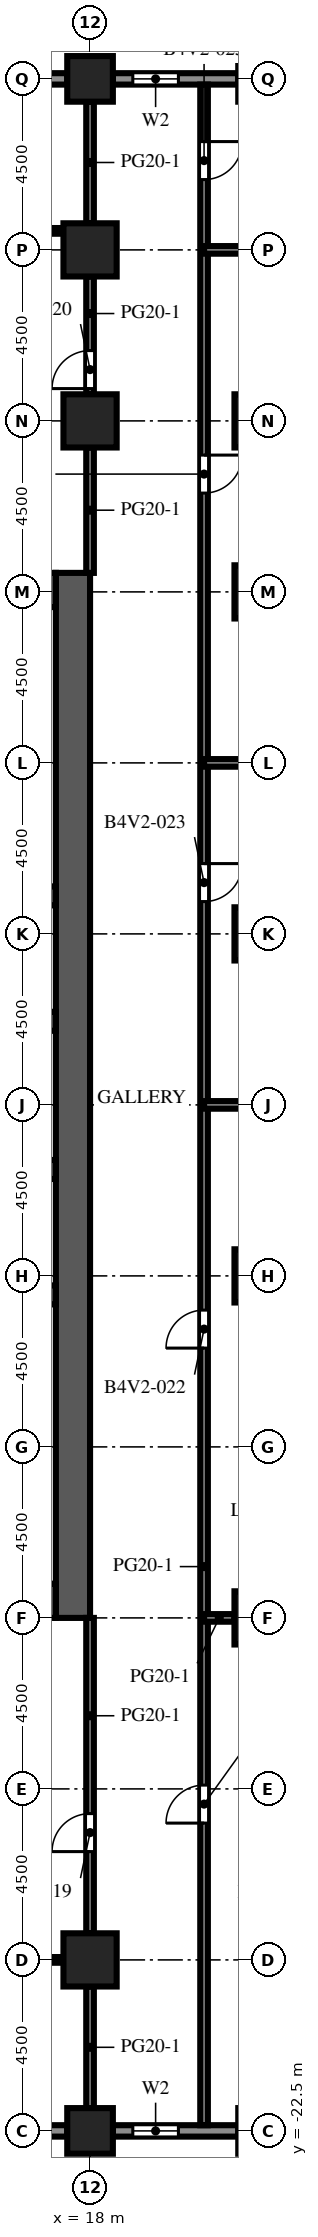
"""IFC4 building model, lengths in metres.
Left out: names, types, materials, properties, quantities, classifications, styles, units other than length and angle.
Written with IfcOpenShell. Run it as: python <this file> out.ifc"""

import sys

from ifc_helpers import new_model, si_unit, direction, frame, frame_2d, origin, origin_2d, place, context, subcontext, project, spatial, rectangle, extrude, element, fill, save


model = new_model("IFC4")
c1 = context("Model", 3, precision=1e-05, world=origin(), true_north=direction((0.0, 1.0)))
c2 = subcontext(c1, "Body", "Model", "MODEL_VIEW")
j1 = project(units=[si_unit("LENGTHUNIT", "METRE"), si_unit("PLANEANGLEUNIT", "RADIAN")], contexts=[c1])
p1 = place(None, origin())
s1 = spatial("IfcSite", under=j1, at=p1, CompositionType="ELEMENT")
p2 = place(p1, origin())
s2 = spatial("IfcBuilding", under=s1, at=p2, CompositionType="ELEMENT")
p3 = place(p2, frame((0.0, 0.0, 137.2)))
s3 = spatial("IfcBuildingStorey", under=s2, at=p3, CompositionType="ELEMENT", Elevation=137.2)
for number, where, z_axis, x_axis in (
    (1, (18.0, -22.5, 0.0), (0.0, 0.0, 1.0), (1.0, 0.0, 0.0)),
    (2, (18.0, 31.5, 0.0), (0.0, 0.0, 1.0), (1.0, 0.0, 0.0)),
):
    element("IfcColumn", number, at=place(p3, frame(where, z_axis=z_axis, x_axis=x_axis)), inside=s3, PredefinedType="COLUMN", context=c2, shape_type="SweptSolid", body=[
        extrude(rectangle(XDim=1.2, YDim=1.2, at=origin_2d()), origin(), (0.0, 0.0, 1.0), 4.1),
    ])
for number, where, z_axis, x_axis in (
    (3, (18.0, -18.0, 0.0), (0.0, 0.0, 1.0), (1.0, 0.0, 0.0)),
    (4, (18.0, 22.5, 0.0), (0.0, 0.0, 1.0), (1.0, 0.0, 0.0)),
    (5, (18.0, 27.0, 0.0), (0.0, 0.0, 1.0), (1.0, 0.0, 0.0)),
    (6, (22.5, -9.0, 0.0), (0.0, 0.0, 1.0), (1.0, 0.0, 0.0)),
    (7, (22.5, 0.0, 0.0), (0.0, 0.0, 1.0), (1.0, 0.0, 0.0)),
    (8, (22.5, 9.0, 0.0), (0.0, 0.0, 1.0), (1.0, 0.0, 0.0)),
    (9, (22.5, 18.0, 0.0), (0.0, 0.0, 1.0), (1.0, 0.0, 0.0)),
    (10, (22.5, 22.5, 0.0), (0.0, 0.0, 1.0), (1.0, 0.0, 0.0)),
):
    element("IfcColumn", number, at=place(p3, frame(where, z_axis=z_axis, x_axis=x_axis)), inside=s3, PredefinedType="COLUMN", context=c2, shape_type="SweptSolid", body=[
        extrude(rectangle(XDim=1.4, YDim=1.4, at=origin_2d()), origin(), (0.0, 0.0, 1.0), 4.1),
    ])
p4 = place(p3, frame((17.55, -9.0, 0.0), z_axis=(0.0, 0.0, 1.0), x_axis=(0.0, 1.0, 0.0)))
e11 = element("IfcWall", 11, at=p4, inside=s3, PredefinedType="SHEAR", context=c2, shape_type="SweptSolid", body=[
    extrude(rectangle(XDim=27.5, YDim=0.9, at=frame_2d((13.75, 0.0))), origin(), (0.0, 0.0, 1.0), 4.1),
])
p5 = place(p4, frame((12.55, 0.0, 0.0)))
e12 = element("IfcOpeningElement", 12, at=p5, cuts=e11, PredefinedType="OPENING", context=c2, shape_type="SweptSolid", body=[
    extrude(rectangle(XDim=2.4, YDim=2.4, at=frame_2d((1.2, 1.2))), frame((0.0, 0.46, 0.0), z_axis=(0.0, -1.0, 0.0), x_axis=(1.0, 0.0, 0.0)), (0.0, 0.0, 1.0), 0.92),
])
p6 = place(p4, frame((6.825, 0.0, 0.0)))
e13 = element("IfcOpeningElement", 13, at=p6, cuts=e11, PredefinedType="OPENING", context=c2, shape_type="SweptSolid", body=[
    extrude(rectangle(XDim=1.2, YDim=2.1, at=frame_2d((0.6, 1.05))), frame((0.0, 0.46, 0.0), z_axis=(0.0, -1.0, 0.0), x_axis=(1.0, 0.0, 0.0)), (0.0, 0.0, 1.0), 0.92),
])
p7 = place(p4, frame((19.475, 0.0, 0.0)))
e14 = element("IfcOpeningElement", 14, at=p7, cuts=e11, PredefinedType="OPENING", context=c2, shape_type="SweptSolid", body=[
    extrude(rectangle(XDim=1.2, YDim=2.1, at=frame_2d((0.6, 1.05))), frame((0.0, 0.46, 0.0), z_axis=(0.0, -1.0, 0.0), x_axis=(1.0, 0.0, 0.0)), (0.0, 0.0, 1.0), 0.92),
])
for number, where, z_axis, x_axis in (
    (15, (6.9, -8.55, 0.0), (0.0, 0.0, 1.0), (1.0, 0.0, 0.0)),
    (16, (6.9, 18.05, 0.0), (0.0, 0.0, 1.0), (1.0, 0.0, 0.0)),
):
    element("IfcWall", number, at=place(p3, frame(where, z_axis=z_axis, x_axis=x_axis)), inside=s3, PredefinedType="SHEAR", context=c2, shape_type="SweptSolid", body=[
        extrude(rectangle(XDim=10.2, YDim=0.9, at=frame_2d((5.1, 0.0))), origin(), (0.0, 0.0, 1.0), 4.1),
    ])
p8 = place(p3, frame((6.9, -0.5, 0.0), z_axis=(0.0, 0.0, 1.0), x_axis=(1.0, 0.0, 0.0)))
e17 = element("IfcWall", 17, at=p8, inside=s3, PredefinedType="SHEAR", context=c2, shape_type="SweptSolid", body=[
    extrude(rectangle(XDim=10.2, YDim=0.5, at=frame_2d((5.1, 0.0))), origin(), (0.0, 0.0, 1.0), 4.1),
])
p9 = place(p3, frame((6.9, 2.8, 0.0), z_axis=(0.0, 0.0, 1.0), x_axis=(1.0, 0.0, 0.0)))
e18 = element("IfcWall", 18, at=p9, inside=s3, PredefinedType="SHEAR", context=c2, shape_type="SweptSolid", body=[
    extrude(rectangle(XDim=10.2, YDim=0.5, at=frame_2d((5.1, 0.0))), origin(), (0.0, 0.0, 1.0), 4.1),
])
p10 = place(p9, frame((0.562, 0.0, 0.0)))
e19 = element("IfcOpeningElement", 19, at=p10, cuts=e18, PredefinedType="OPENING", context=c2, shape_type="SweptSolid", body=[
    extrude(rectangle(XDim=1.1, YDim=2.1, at=frame_2d((0.55, 1.05))), frame((0.0, 0.26, 0.0), z_axis=(0.0, -1.0, 0.0), x_axis=(1.0, 0.0, 0.0)), (0.0, 0.0, 1.0), 0.52),
])
p11 = place(p9, frame((3.238, 0.0, 0.0)))
e20 = element("IfcOpeningElement", 20, at=p11, cuts=e18, PredefinedType="OPENING", context=c2, shape_type="SweptSolid", body=[
    extrude(rectangle(XDim=1.1, YDim=2.1, at=frame_2d((0.55, 1.05))), frame((0.0, 0.26, 0.0), z_axis=(0.0, -1.0, 0.0), x_axis=(1.0, 0.0, 0.0)), (0.0, 0.0, 1.0), 0.52),
])
p12 = place(p9, frame((8.538, 0.0, 0.0)))
e21 = element("IfcOpeningElement", 21, at=p12, cuts=e18, PredefinedType="OPENING", context=c2, shape_type="SweptSolid", body=[
    extrude(rectangle(XDim=1.1, YDim=2.1, at=frame_2d((0.55, 1.05))), frame((0.0, 0.26, 0.0), z_axis=(0.0, -1.0, 0.0), x_axis=(1.0, 0.0, 0.0)), (0.0, 0.0, 1.0), 0.52),
])
p13 = place(p3, frame((6.9, 6.7, 0.0), z_axis=(0.0, 0.0, 1.0), x_axis=(1.0, 0.0, 0.0)))
e22 = element("IfcWall", 22, at=p13, inside=s3, PredefinedType="SHEAR", context=c2, shape_type="SweptSolid", body=[
    extrude(rectangle(XDim=10.2, YDim=0.5, at=frame_2d((5.1, 0.0))), origin(), (0.0, 0.0, 1.0), 4.1),
])
p14 = place(p13, frame((0.562, 0.0, 0.0)))
e23 = element("IfcOpeningElement", 23, at=p14, cuts=e22, PredefinedType="OPENING", context=c2, shape_type="SweptSolid", body=[
    extrude(rectangle(XDim=1.1, YDim=2.1, at=frame_2d((0.55, 1.05))), frame((0.0, 0.26, 0.0), z_axis=(0.0, -1.0, 0.0), x_axis=(1.0, 0.0, 0.0)), (0.0, 0.0, 1.0), 0.52),
])
p15 = place(p13, frame((3.288, 0.0, 0.0)))
e24 = element("IfcOpeningElement", 24, at=p15, cuts=e22, PredefinedType="OPENING", context=c2, shape_type="SweptSolid", body=[
    extrude(rectangle(XDim=1.0, YDim=2.1, at=frame_2d((0.5, 1.05))), frame((0.0, 0.26, 0.0), z_axis=(0.0, -1.0, 0.0), x_axis=(1.0, 0.0, 0.0)), (0.0, 0.0, 1.0), 0.52),
])
p16 = place(p13, frame((5.913, 0.0, 0.0)))
e25 = element("IfcOpeningElement", 25, at=p16, cuts=e22, PredefinedType="OPENING", context=c2, shape_type="SweptSolid", body=[
    extrude(rectangle(XDim=1.0, YDim=2.1, at=frame_2d((0.5, 1.05))), frame((0.0, 0.26, 0.0), z_axis=(0.0, -1.0, 0.0), x_axis=(1.0, 0.0, 0.0)), (0.0, 0.0, 1.0), 0.52),
])
p17 = place(p13, frame((8.587, 0.0, 0.0)))
e26 = element("IfcOpeningElement", 26, at=p17, cuts=e22, PredefinedType="OPENING", context=c2, shape_type="SweptSolid", body=[
    extrude(rectangle(XDim=1.0, YDim=2.1, at=frame_2d((0.5, 1.05))), frame((0.0, 0.26, 0.0), z_axis=(0.0, -1.0, 0.0), x_axis=(1.0, 0.0, 0.0)), (0.0, 0.0, 1.0), 0.52),
])
p18 = place(p3, frame((6.9, 10.0, 0.0), z_axis=(0.0, 0.0, 1.0), x_axis=(1.0, 0.0, 0.0)))
e27 = element("IfcWall", 27, at=p18, inside=s3, PredefinedType="SHEAR", context=c2, shape_type="SweptSolid", body=[
    extrude(rectangle(XDim=10.2, YDim=0.5, at=frame_2d((5.1, 0.0))), origin(), (0.0, 0.0, 1.0), 4.1),
])
p19 = place(p3, frame((17.4, -22.5, 0.0), z_axis=(0.0, 0.0, 1.0), x_axis=(-1.0, 0.0, 0.0)))
e28 = element("IfcWall", 28, at=p19, inside=s3, PredefinedType="SOLIDWALL", context=c2, shape_type="SweptSolid", body=[
    extrude(rectangle(XDim=3.3, YDim=0.3, at=frame_2d((1.65, 0.0))), origin(), (0.0, 0.0, 1.0), 2.75),
])
p20 = place(p19, frame((1.15, 0.0, 0.0)))
e29 = element("IfcOpeningElement", 29, at=p20, cuts=e28, PredefinedType="OPENING", context=c2, shape_type="SweptSolid", body=[
    extrude(rectangle(XDim=1.0, YDim=2.2, at=frame_2d((0.5, 1.1))), frame((0.0, 0.16, 0.0), z_axis=(0.0, -1.0, 0.0), x_axis=(1.0, 0.0, 0.0)), (0.0, 0.0, 1.0), 0.32),
])
p21 = place(p3, frame((21.9, -22.5, 0.0), z_axis=(0.0, 0.0, 1.0), x_axis=(-1.0, 0.0, 0.0)))
e30 = element("IfcWall", 30, at=p21, inside=s3, PredefinedType="SOLIDWALL", context=c2, shape_type="SweptSolid", body=[
    extrude(rectangle(XDim=3.3, YDim=0.3, at=frame_2d((1.65, 0.0))), origin(), (0.0, 0.0, 1.0), 2.75),
])
p22 = place(p21, frame((1.575, 0.0, 0.8)))
e31 = element("IfcOpeningElement", 31, at=p22, cuts=e30, PredefinedType="OPENING", context=c2, shape_type="SweptSolid", body=[
    extrude(rectangle(XDim=1.2, YDim=1.7, at=frame_2d((0.6, 0.85))), frame((0.0, 0.16, 0.0), z_axis=(0.0, -1.0, 0.0), x_axis=(1.0, 0.0, 0.0)), (0.0, 0.0, 1.0), 0.32),
])
p23 = place(p3, frame((18.6, 31.5, 0.0), z_axis=(0.0, 0.0, 1.0), x_axis=(1.0, 0.0, 0.0)))
e32 = element("IfcWall", 32, at=p23, inside=s3, PredefinedType="SOLIDWALL", context=c2, shape_type="SweptSolid", body=[
    extrude(rectangle(XDim=3.3, YDim=0.3, at=frame_2d((1.65, 0.0))), origin(), (0.0, 0.0, 1.0), 2.75),
])
p24 = place(p23, frame((0.525, 0.0, 0.8)))
e33 = element("IfcOpeningElement", 33, at=p24, cuts=e32, PredefinedType="OPENING", context=c2, shape_type="SweptSolid", body=[
    extrude(rectangle(XDim=1.2, YDim=1.7, at=frame_2d((0.6, 0.85))), frame((0.0, 0.16, 0.0), z_axis=(0.0, -1.0, 0.0), x_axis=(1.0, 0.0, 0.0)), (0.0, 0.0, 1.0), 0.32),
])
p25 = place(p3, frame((14.1, 31.5, 0.0), z_axis=(0.0, 0.0, 1.0), x_axis=(1.0, 0.0, 0.0)))
e34 = element("IfcWall", 34, at=p25, inside=s3, PredefinedType="SOLIDWALL", context=c2, shape_type="SweptSolid", body=[
    extrude(rectangle(XDim=3.3, YDim=0.3, at=frame_2d((1.65, 0.0))), origin(), (0.0, 0.0, 1.0), 2.75),
])
p26 = place(p25, frame((1.15, 0.0, 0.0)))
e35 = element("IfcOpeningElement", 35, at=p26, cuts=e34, PredefinedType="OPENING", context=c2, shape_type="SweptSolid", body=[
    extrude(rectangle(XDim=1.0, YDim=2.2, at=frame_2d((0.5, 1.1))), frame((0.0, 0.16, 0.0), z_axis=(0.0, -1.0, 0.0), x_axis=(1.0, 0.0, 0.0)), (0.0, 0.0, 1.0), 0.32),
])
p27 = place(p3, frame((18.0, -21.9, 0.0), z_axis=(0.0, 0.0, 1.0), x_axis=(0.0, 1.0, 0.0)))
e36 = element("IfcWall", 36, at=p27, inside=s3, PredefinedType="PARTITIONING", context=c2, shape_type="SweptSolid", body=[
    extrude(rectangle(XDim=3.2, YDim=0.2, at=frame_2d((1.6, 0.0))), origin(), (0.0, 0.0, 1.0), 3.65),
])
p28 = place(p3, frame((18.0, -17.3, 0.0), z_axis=(0.0, 0.0, 1.0), x_axis=(0.0, 1.0, 0.0)))
e37 = element("IfcWall", 37, at=p28, inside=s3, PredefinedType="PARTITIONING", context=c2, shape_type="SweptSolid", body=[
    extrude(rectangle(XDim=8.3, YDim=0.2, at=frame_2d((4.15, 0.0))), origin(), (0.0, 0.0, 1.0), 3.65),
])
p29 = place(p28, frame((2.15, 0.0, 0.0)))
e38 = element("IfcOpeningElement", 38, at=p29, cuts=e37, PredefinedType="OPENING", context=c2, shape_type="SweptSolid", body=[
    extrude(rectangle(XDim=1.0, YDim=2.1, at=frame_2d((0.5, 1.05))), frame((0.0, 0.11, 0.0), z_axis=(0.0, -1.0, 0.0), x_axis=(1.0, 0.0, 0.0)), (0.0, 0.0, 1.0), 0.22),
])
p30 = place(p3, frame((18.0, 18.5, 0.0), z_axis=(0.0, 0.0, 1.0), x_axis=(0.0, 1.0, 0.0)))
e39 = element("IfcWall", 39, at=p30, inside=s3, PredefinedType="PARTITIONING", context=c2, shape_type="SweptSolid", body=[
    extrude(rectangle(XDim=3.3, YDim=0.2, at=frame_2d((1.65, 0.0))), origin(), (0.0, 0.0, 1.0), 3.65),
])
p31 = place(p3, frame((18.0, 23.2, 0.0), z_axis=(0.0, 0.0, 1.0), x_axis=(0.0, 1.0, 0.0)))
e40 = element("IfcWall", 40, at=p31, inside=s3, PredefinedType="PARTITIONING", context=c2, shape_type="SweptSolid", body=[
    extrude(rectangle(XDim=3.1, YDim=0.2, at=frame_2d((1.55, 0.0))), origin(), (0.0, 0.0, 1.0), 3.65),
])
p32 = place(p31, frame((0.15, 0.0, 0.0)))
e41 = element("IfcOpeningElement", 41, at=p32, cuts=e40, PredefinedType="OPENING", context=c2, shape_type="SweptSolid", body=[
    extrude(rectangle(XDim=1.0, YDim=2.1, at=frame_2d((0.5, 1.05))), frame((0.0, 0.11, 0.0), z_axis=(0.0, -1.0, 0.0), x_axis=(1.0, 0.0, 0.0)), (0.0, 0.0, 1.0), 0.22),
])
p33 = place(p3, frame((18.0, 27.7, 0.0), z_axis=(0.0, 0.0, 1.0), x_axis=(0.0, 1.0, 0.0)))
e42 = element("IfcWall", 42, at=p33, inside=s3, PredefinedType="PARTITIONING", context=c2, shape_type="SweptSolid", body=[
    extrude(rectangle(XDim=3.2, YDim=0.2, at=frame_2d((1.6, 0.0))), origin(), (0.0, 0.0, 1.0), 3.65),
])
p34 = place(p3, frame((21.0, 31.35, 0.0), z_axis=(0.0, 0.0, 1.0), x_axis=(0.0, -1.0, 0.0)))
e43 = element("IfcWall", 43, at=p34, inside=s3, PredefinedType="PARTITIONING", context=c2, shape_type="SweptSolid", body=[
    extrude(rectangle(XDim=53.7, YDim=0.2, at=frame_2d((26.85, 0.0))), origin(), (0.0, 0.0, 1.0), 3.65),
])
p35 = place(p34, frame((44.75, 0.0, 0.0)))
e44 = element("IfcOpeningElement", 44, at=p35, cuts=e43, PredefinedType="OPENING", context=c2, shape_type="SweptSolid", body=[
    extrude(rectangle(XDim=1.0, YDim=2.1, at=frame_2d((0.5, 1.05))), frame((0.0, 0.11, 0.0), z_axis=(0.0, -1.0, 0.0), x_axis=(1.0, 0.0, 0.0)), (0.0, 0.0, 1.0), 0.22),
])
p36 = place(p34, frame((32.25, 0.0, 0.0)))
e45 = element("IfcOpeningElement", 45, at=p36, cuts=e43, PredefinedType="OPENING", context=c2, shape_type="SweptSolid", body=[
    extrude(rectangle(XDim=1.0, YDim=2.1, at=frame_2d((0.5, 1.05))), frame((0.0, 0.11, 0.0), z_axis=(0.0, -1.0, 0.0), x_axis=(1.0, 0.0, 0.0)), (0.0, 0.0, 1.0), 0.22),
])
p37 = place(p34, frame((20.5, 0.0, 0.0)))
e46 = element("IfcOpeningElement", 46, at=p37, cuts=e43, PredefinedType="OPENING", context=c2, shape_type="SweptSolid", body=[
    extrude(rectangle(XDim=1.0, YDim=2.1, at=frame_2d((0.5, 1.05))), frame((0.0, 0.11, 0.0), z_axis=(0.0, -1.0, 0.0), x_axis=(1.0, 0.0, 0.0)), (0.0, 0.0, 1.0), 0.22),
])
p38 = place(p34, frame((9.75, 0.0, 0.0)))
e47 = element("IfcOpeningElement", 47, at=p38, cuts=e43, PredefinedType="OPENING", context=c2, shape_type="SweptSolid", body=[
    extrude(rectangle(XDim=1.0, YDim=2.1, at=frame_2d((0.5, 1.05))), frame((0.0, 0.11, 0.0), z_axis=(0.0, -1.0, 0.0), x_axis=(1.0, 0.0, 0.0)), (0.0, 0.0, 1.0), 0.22),
])
p39 = place(p34, frame((1.5, 0.0, 0.0)))
e48 = element("IfcOpeningElement", 48, at=p39, cuts=e43, PredefinedType="OPENING", context=c2, shape_type="SweptSolid", body=[
    extrude(rectangle(XDim=1.0, YDim=2.1, at=frame_2d((0.5, 1.05))), frame((0.0, 0.11, 0.0), z_axis=(0.0, -1.0, 0.0), x_axis=(1.0, 0.0, 0.0)), (0.0, 0.0, 1.0), 0.22),
])
p40 = place(p3, frame((17.3, -18.0, 0.0), z_axis=(0.0, 0.0, 1.0), x_axis=(-1.0, 0.0, 0.0)))
e49 = element("IfcWall", 49, at=p40, inside=s3, PredefinedType="PARTITIONING", context=c2, shape_type="SweptSolid", body=[
    extrude(rectangle(XDim=7.6, YDim=0.15, at=frame_2d((3.8, 0.0))), origin(), (0.0, 0.0, 1.0), 3.65),
])
p41 = place(p40, frame((4.95, 0.0, 0.0)))
e50 = element("IfcOpeningElement", 50, at=p41, cuts=e49, PredefinedType="OPENING", context=c2, shape_type="SweptSolid", body=[
    extrude(rectangle(XDim=1.0, YDim=2.1, at=frame_2d((0.5, 1.05))), frame((0.0, 0.085, 0.0), z_axis=(0.0, -1.0, 0.0), x_axis=(1.0, 0.0, 0.0)), (0.0, 0.0, 1.0), 0.17),
])
p42 = place(p3, frame((21.0, -9.0, 0.0), z_axis=(0.0, 0.0, 1.0), x_axis=(1.0, 0.0, 0.0)))
e51 = element("IfcWall", 51, at=p42, inside=s3, PredefinedType="PARTITIONING", context=c2, shape_type="SweptSolid", body=[
    extrude(rectangle(XDim=0.8, YDim=0.2, at=frame_2d((0.4, 0.0))), origin(), (0.0, 0.0, 1.0), 3.65),
])
for number, where, z_axis, x_axis in (
    (52, (21.0, 4.5, 0.0), (0.0, 0.0, 1.0), (1.0, 0.0, 0.0)),
    (53, (21.0, 13.5, 0.0), (0.0, 0.0, 1.0), (1.0, 0.0, 0.0)),
    (54, (21.0, 27.0, 0.0), (0.0, 0.0, 1.0), (1.0, 0.0, 0.0)),
):
    element("IfcWall", number, at=place(p3, frame(where, z_axis=z_axis, x_axis=x_axis)), inside=s3, PredefinedType="PARTITIONING", context=c2, shape_type="SweptSolid", body=[
        extrude(rectangle(XDim=5.4, YDim=0.2, at=frame_2d((2.7, 0.0))), origin(), (0.0, 0.0, 1.0), 3.65),
    ])
p43 = place(p3, frame((9.7, 27.5, 0.0), z_axis=(0.0, 0.0, 1.0), x_axis=(1.0, 0.0, 0.0)))
e55 = element("IfcWall", 55, at=p43, inside=s3, PredefinedType="PARTITIONING", context=c2, shape_type="SweptSolid", body=[
    extrude(rectangle(XDim=7.6, YDim=0.15, at=frame_2d((3.8, 0.0))), origin(), (0.0, 0.0, 1.0), 3.65),
])
p44 = place(p43, frame((0.65, 0.0, 0.0)))
e56 = element("IfcOpeningElement", 56, at=p44, cuts=e55, PredefinedType="OPENING", context=c2, shape_type="SweptSolid", body=[
    extrude(rectangle(XDim=1.0, YDim=2.1, at=frame_2d((0.5, 1.05))), frame((0.0, 0.085, 0.0), z_axis=(0.0, -1.0, 0.0), x_axis=(1.0, 0.0, 0.0)), (0.0, 0.0, 1.0), 0.17),
])
p45 = place(p22, origin())
e57 = element("IfcWindow", 57, at=p45, inside=s3, PartitioningType="SINGLE_PANEL", PredefinedType="WINDOW", context=c2, shape_type="SweptSolid", body=[
    extrude(rectangle(XDim=1.2, YDim=1.7, at=frame_2d((0.6, 0.85))), frame((0.0, 0.03, 0.0), z_axis=(0.0, -1.0, 0.0), x_axis=(1.0, 0.0, 0.0)), (0.0, 0.0, 1.0), 0.06),
])
fill(e31, e57)
p46 = place(p24, origin())
e58 = element("IfcWindow", 58, at=p46, inside=s3, PartitioningType="SINGLE_PANEL", PredefinedType="WINDOW", context=c2, shape_type="SweptSolid", body=[
    extrude(rectangle(XDim=1.2, YDim=1.7, at=frame_2d((0.6, 0.85))), frame((0.0, 0.03, 0.0), z_axis=(0.0, -1.0, 0.0), x_axis=(1.0, 0.0, 0.0)), (0.0, 0.0, 1.0), 0.06),
])
fill(e33, e58)
p47 = place(p5, origin())
e59 = element("IfcDoor", 59, at=p47, inside=s3, OperationType="DOUBLE_DOOR_DOUBLE_SWING", PredefinedType="DOOR", context=c2, shape_type="SweptSolid", body=[
    extrude(rectangle(XDim=2.4, YDim=2.4, at=frame_2d((1.2, 1.2))), frame((0.0, 0.025, 0.0), z_axis=(0.0, -1.0, 0.0), x_axis=(1.0, 0.0, 0.0)), (0.0, 0.0, 1.0), 0.05),
])
fill(e12, e59)
p48 = place(p6, frame((1.2, 0.0, 0.0), z_axis=(0.0, 0.0, 1.0), x_axis=(-1.0, 0.0, 0.0)))
e60 = element("IfcDoor", 60, at=p48, inside=s3, OperationType="SINGLE_SWING_LEFT", PredefinedType="DOOR", context=c2, shape_type="SweptSolid", body=[
    extrude(rectangle(XDim=1.2, YDim=2.1, at=frame_2d((0.6, 1.05))), frame((0.0, 0.025, 0.0), z_axis=(0.0, -1.0, 0.0), x_axis=(1.0, 0.0, 0.0)), (0.0, 0.0, 1.0), 0.05),
])
fill(e13, e60)
p49 = place(p7, frame((1.2, 0.0, 0.0), z_axis=(0.0, 0.0, 1.0), x_axis=(-1.0, 0.0, 0.0)))
e61 = element("IfcDoor", 61, at=p49, inside=s3, OperationType="SINGLE_SWING_LEFT", PredefinedType="DOOR", context=c2, shape_type="SweptSolid", body=[
    extrude(rectangle(XDim=1.2, YDim=2.1, at=frame_2d((0.6, 1.05))), frame((0.0, 0.025, 0.0), z_axis=(0.0, -1.0, 0.0), x_axis=(1.0, 0.0, 0.0)), (0.0, 0.0, 1.0), 0.05),
])
fill(e14, e61)
p50 = place(p29, origin())
e62 = element("IfcDoor", 62, at=p50, inside=s3, OperationType="SINGLE_SWING_LEFT", PredefinedType="DOOR", context=c2, shape_type="SweptSolid", body=[
    extrude(rectangle(XDim=1.0, YDim=2.1, at=frame_2d((0.5, 1.05))), frame((0.0, 0.025, 0.0), z_axis=(0.0, -1.0, 0.0), x_axis=(1.0, 0.0, 0.0)), (0.0, 0.0, 1.0), 0.05),
])
fill(e38, e62)
p51 = place(p32, origin())
e63 = element("IfcDoor", 63, at=p51, inside=s3, OperationType="SINGLE_SWING_LEFT", PredefinedType="DOOR", context=c2, shape_type="SweptSolid", body=[
    extrude(rectangle(XDim=1.0, YDim=2.1, at=frame_2d((0.5, 1.05))), frame((0.0, 0.025, 0.0), z_axis=(0.0, -1.0, 0.0), x_axis=(1.0, 0.0, 0.0)), (0.0, 0.0, 1.0), 0.05),
])
fill(e41, e63)
p52 = place(p35, origin())
e64 = element("IfcDoor", 64, at=p52, inside=s3, OperationType="SINGLE_SWING_RIGHT", PredefinedType="DOOR", context=c2, shape_type="SweptSolid", body=[
    extrude(rectangle(XDim=1.0, YDim=2.1, at=frame_2d((0.5, 1.05))), frame((0.0, 0.025, 0.0), z_axis=(0.0, -1.0, 0.0), x_axis=(1.0, 0.0, 0.0)), (0.0, 0.0, 1.0), 0.05),
])
fill(e44, e64)
p53 = place(p36, origin())
e65 = element("IfcDoor", 65, at=p53, inside=s3, OperationType="SINGLE_SWING_RIGHT", PredefinedType="DOOR", context=c2, shape_type="SweptSolid", body=[
    extrude(rectangle(XDim=1.0, YDim=2.1, at=frame_2d((0.5, 1.05))), frame((0.0, 0.025, 0.0), z_axis=(0.0, -1.0, 0.0), x_axis=(1.0, 0.0, 0.0)), (0.0, 0.0, 1.0), 0.05),
])
fill(e45, e65)
p54 = place(p37, origin())
e66 = element("IfcDoor", 66, at=p54, inside=s3, OperationType="SINGLE_SWING_LEFT", PredefinedType="DOOR", context=c2, shape_type="SweptSolid", body=[
    extrude(rectangle(XDim=1.0, YDim=2.1, at=frame_2d((0.5, 1.05))), frame((0.0, 0.025, 0.0), z_axis=(0.0, -1.0, 0.0), x_axis=(1.0, 0.0, 0.0)), (0.0, 0.0, 1.0), 0.05),
])
fill(e46, e66)
p55 = place(p38, origin())
e67 = element("IfcDoor", 67, at=p55, inside=s3, OperationType="SINGLE_SWING_LEFT", PredefinedType="DOOR", context=c2, shape_type="SweptSolid", body=[
    extrude(rectangle(XDim=1.0, YDim=2.1, at=frame_2d((0.5, 1.05))), frame((0.0, 0.025, 0.0), z_axis=(0.0, -1.0, 0.0), x_axis=(1.0, 0.0, 0.0)), (0.0, 0.0, 1.0), 0.05),
])
fill(e47, e67)
p56 = place(p39, origin())
e68 = element("IfcDoor", 68, at=p56, inside=s3, OperationType="SINGLE_SWING_LEFT", PredefinedType="DOOR", context=c2, shape_type="SweptSolid", body=[
    extrude(rectangle(XDim=1.0, YDim=2.1, at=frame_2d((0.5, 1.05))), frame((0.0, 0.025, 0.0), z_axis=(0.0, -1.0, 0.0), x_axis=(1.0, 0.0, 0.0)), (0.0, 0.0, 1.0), 0.05),
])
fill(e48, e68)
save(model, sys.argv[1])
